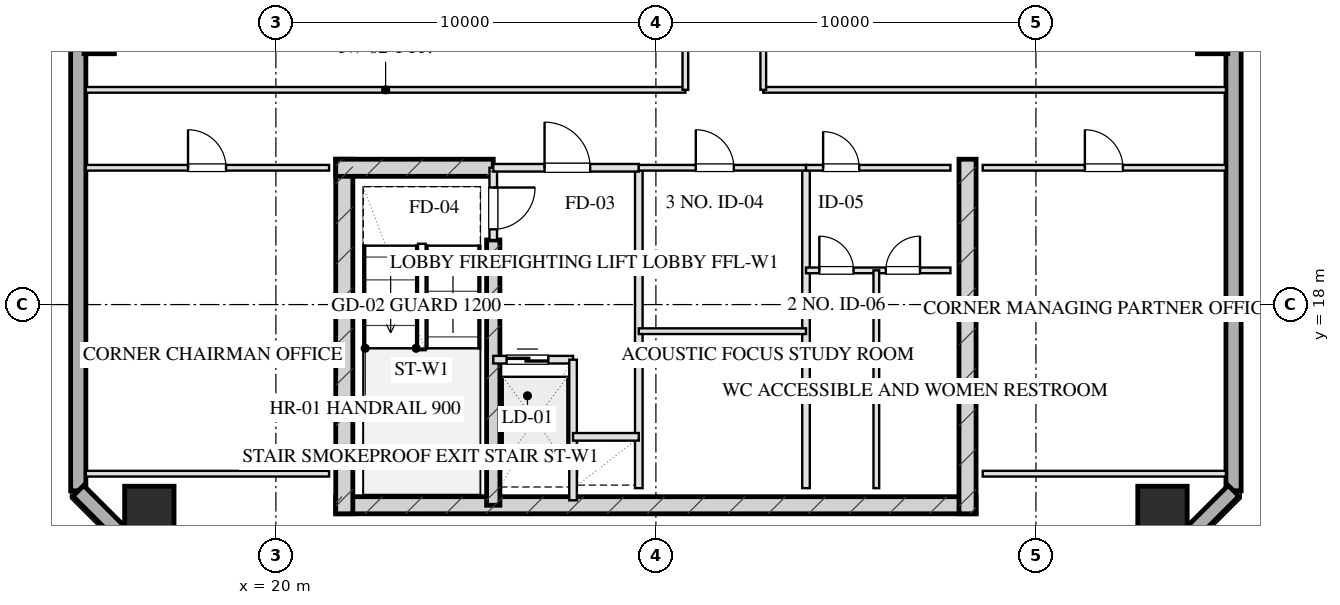
"""IFC4 building model, lengths in metres.
Left out: names, types, materials, properties, quantities, classifications, styles, units other than length and angle.
Written with IfcOpenShell. Run it as: python <this file> out.ifc"""

import sys

from ifc_helpers import new_model, si_unit, direction, frame, frame_2d, origin, origin_2d, place, context, subcontext, project, spatial, rectangle, hollow_rectangle, extrude, element, fill, save


model = new_model("IFC4")
c1 = context("Model", 3, precision=1e-05, world=origin(), true_north=direction((0.0, 1.0)))
c2 = subcontext(c1, "Body", "Model", "MODEL_VIEW")
j1 = project(units=[si_unit("LENGTHUNIT", "METRE"), si_unit("PLANEANGLEUNIT", "RADIAN")], contexts=[c1])
p1 = place(None, origin())
s1 = spatial("IfcSite", under=j1, at=p1, CompositionType="ELEMENT")
p2 = place(p1, origin())
s2 = spatial("IfcBuilding", under=s1, at=p2, CompositionType="ELEMENT")
p3 = place(p2, frame((0.0, 0.0, 250.4)))
s3 = spatial("IfcBuildingStorey", under=s2, at=p3, CompositionType="ELEMENT", Elevation=250.4)
p4 = place(p3, frame((21.575, 12.72, 0.0), z_axis=(0.0, 0.0, 1.0), x_axis=(1.0, 0.0, 0.0)))
e1 = element("IfcWall", 1, at=p4, inside=s3, PredefinedType="SHEAR", context=c2, shape_type="SweptSolid", body=[
    extrude(rectangle(XDim=16.85, YDim=0.45, at=frame_2d((8.425, 0.0))), origin(), (0.0, 0.0, 1.0), 3.2),
])
for number, where, z_axis, x_axis in (
    (2, (21.8, 21.825, 0.0), (0.0, 0.0, 1.0), (0.0, -1.0, 0.0)),
    (3, (38.2, 21.825, 0.0), (0.0, 0.0, 1.0), (0.0, -1.0, 0.0)),
):
    element("IfcWall", number, at=place(p3, frame(where, z_axis=z_axis, x_axis=x_axis)), inside=s3, PredefinedType="SHEAR", context=c2, shape_type="SweptSolid", body=[
        extrude(rectangle(XDim=9.33, YDim=0.45, at=frame_2d((4.665, 0.0))), origin(), (0.0, 0.0, 1.0), 3.2),
    ])
p5 = place(p3, frame((25.72, 19.7, 0.0), z_axis=(0.0, 0.0, 1.0), x_axis=(0.0, -1.0, 0.0)))
e4 = element("IfcWall", 4, at=p5, inside=s3, PredefinedType="SHEAR", context=c2, shape_type="SweptSolid", body=[
    extrude(rectangle(XDim=6.98, YDim=0.35, at=frame_2d((3.49, 0.0))), origin(), (0.0, 0.0, 1.0), 3.2),
])
p6 = place(p3, frame((21.575, 21.6, 0.0), z_axis=(0.0, 0.0, 1.0), x_axis=(1.0, 0.0, 0.0)))
e5 = element("IfcWall", 5, at=p6, inside=s3, PredefinedType="SHEAR", context=c2, shape_type="SweptSolid", body=[
    extrude(rectangle(XDim=4.145, YDim=0.45, at=frame_2d((2.073, 0.0))), origin(), (0.0, 0.0, 1.0), 3.2),
])
for number, where, z_axis, x_axis in (
    (6, (16.67, 12.57, 0.0), (0.0, 0.0, 1.0), (1.0, 0.0, 0.0)),
    (7, (43.33, 12.57, 0.0), (0.0, 0.0, 1.0), (1.0, 0.0, 0.0)),
):
    element("IfcColumn", number, at=place(p3, frame(where, z_axis=z_axis, x_axis=x_axis)), inside=s3, PredefinedType="COLUMN", context=c2, shape_type="SweptSolid", body=[
        extrude(hollow_rectangle(XDim=1.3, YDim=1.3, WallThickness=0.045, at=origin_2d()), origin(), (0.0, 0.0, 1.0), 3.201),
    ])
for number, where, z_axis, x_axis in (
    (8, (15.35, 25.0, 0.0), (0.0, 0.0, 1.0), (1.0, 0.0, 0.0)),
    (9, (44.65, 25.0, 0.0), (0.0, 0.0, 1.0), (1.0, 0.0, 0.0)),
):
    element("IfcColumn", number, at=place(p3, frame(where, z_axis=z_axis, x_axis=x_axis)), inside=s3, PredefinedType="COLUMN", context=c2, shape_type="SweptSolid", body=[
        extrude(hollow_rectangle(XDim=0.8, YDim=0.8, WallThickness=0.028, at=origin_2d()), origin(), (0.0, 0.0, 1.0), 3.201),
    ])
p7 = place(p3, frame((14.8, 13.1, 0.0), z_axis=(0.0, 0.0, 1.0), x_axis=(0.0, 1.0, 0.0)))
e10 = element("IfcWall", 10, at=p7, inside=s3, PredefinedType="SOLIDWALL", context=c2, shape_type="SweptSolid", body=[
    extrude(rectangle(XDim=41.8, YDim=0.4, at=frame_2d((20.9, 0.0))), origin(), (0.0, 0.0, 1.0), 2.36),
])
p8 = place(p7, frame((22.525, 0.0, 0.75)))
e11 = element("IfcOpeningElement", 11, at=p8, cuts=e10, PredefinedType="OPENING", context=c2, shape_type="SweptSolid", body=[
    extrude(rectangle(XDim=1.95, YDim=1.21, at=frame_2d((0.975, 0.605))), frame((0.0, 0.21, 0.0), z_axis=(0.0, -1.0, 0.0), x_axis=(1.0, 0.0, 0.0)), (0.0, 0.0, 1.0), 0.42),
])
p9 = place(p7, frame((26.325, 0.0, 0.75)))
e12 = element("IfcOpeningElement", 12, at=p9, cuts=e10, PredefinedType="OPENING", context=c2, shape_type="SweptSolid", body=[
    extrude(rectangle(XDim=1.95, YDim=1.21, at=frame_2d((0.975, 0.605))), frame((0.0, 0.21, 0.0), z_axis=(0.0, -1.0, 0.0), x_axis=(1.0, 0.0, 0.0)), (0.0, 0.0, 1.0), 0.42),
])
p10 = place(p7, frame((17.25, 0.0, 0.0)))
e13 = element("IfcOpeningElement", 13, at=p10, cuts=e10, PredefinedType="OPENING", context=c2, shape_type="SweptSolid", body=[
    extrude(rectangle(XDim=1.1, YDim=2.15, at=frame_2d((0.55, 1.075))), frame((0.0, 0.21, 0.0), z_axis=(0.0, -1.0, 0.0), x_axis=(1.0, 0.0, 0.0)), (0.0, 0.0, 1.0), 0.42),
])
p11 = place(p3, frame((45.2, 54.9, 0.0), z_axis=(0.0, 0.0, 1.0), x_axis=(0.0, -1.0, 0.0)))
e14 = element("IfcWall", 14, at=p11, inside=s3, PredefinedType="SOLIDWALL", context=c2, shape_type="SweptSolid", body=[
    extrude(rectangle(XDim=41.8, YDim=0.4, at=frame_2d((20.9, 0.0))), origin(), (0.0, 0.0, 1.0), 2.36),
])
p12 = place(p11, frame((17.325, 0.0, 0.75)))
e15 = element("IfcOpeningElement", 15, at=p12, cuts=e14, PredefinedType="OPENING", context=c2, shape_type="SweptSolid", body=[
    extrude(rectangle(XDim=1.95, YDim=1.21, at=frame_2d((0.975, 0.605))), frame((0.0, 0.21, 0.0), z_axis=(0.0, -1.0, 0.0), x_axis=(1.0, 0.0, 0.0)), (0.0, 0.0, 1.0), 0.42),
])
p13 = place(p11, frame((13.525, 0.0, 0.75)))
e16 = element("IfcOpeningElement", 16, at=p13, cuts=e14, PredefinedType="OPENING", context=c2, shape_type="SweptSolid", body=[
    extrude(rectangle(XDim=1.95, YDim=1.21, at=frame_2d((0.975, 0.605))), frame((0.0, 0.21, 0.0), z_axis=(0.0, -1.0, 0.0), x_axis=(1.0, 0.0, 0.0)), (0.0, 0.0, 1.0), 0.42),
])
p14 = place(p11, frame((26.15, 0.0, 0.0)))
e17 = element("IfcOpeningElement", 17, at=p14, cuts=e14, PredefinedType="OPENING", context=c2, shape_type="SweptSolid", body=[
    extrude(rectangle(XDim=1.1, YDim=2.15, at=frame_2d((0.55, 1.075))), frame((0.0, 0.21, 0.0), z_axis=(0.0, -1.0, 0.0), x_axis=(1.0, 0.0, 0.0)), (0.0, 0.0, 1.0), 0.42),
])
for number, where, z_axis, x_axis in (
    (18, (45.2, 13.1, 0.0), (0.0, 0.0, 1.0), (-0.707, -0.707, 0.0)),
    (19, (17.2, 10.7, 0.0), (0.0, 0.0, 1.0), (-0.707, 0.707, 0.0)),
):
    element("IfcWall", number, at=place(p3, frame(where, z_axis=z_axis, x_axis=x_axis)), inside=s3, PredefinedType="SOLIDWALL", context=c2, shape_type="SweptSolid", body=[
        extrude(rectangle(XDim=3.394, YDim=0.4, at=frame_2d((1.697, 0.0))), origin(), (0.0, 0.0, 1.0), 2.36),
    ])
p15 = place(p3, frame((25.72, 21.6, 0.0), z_axis=(0.0, 0.0, 1.0), x_axis=(0.0, -1.0, 0.0)))
e20 = element("IfcWall", 20, at=p15, inside=s3, PredefinedType="PARTITIONING", context=c2, shape_type="SweptSolid", body=[
    extrude(rectangle(XDim=1.9, YDim=0.2, at=frame_2d((0.95, 0.0))), origin(), (0.0, 0.0, 1.0), 2.925),
])
p16 = place(p15, frame((0.52, 0.0, 0.0)))
e21 = element("IfcOpeningElement", 21, at=p16, cuts=e20, PredefinedType="OPENING", context=c2, shape_type="SweptSolid", body=[
    extrude(rectangle(XDim=1.1, YDim=2.05, at=frame_2d((0.55, 1.025))), frame((0.0, 0.11, 0.0), z_axis=(0.0, -1.0, 0.0), x_axis=(1.0, 0.0, 0.0)), (0.0, 0.0, 1.0), 0.22),
])
p17 = place(p3, frame((29.55, 21.6, 0.0), z_axis=(0.0, 0.0, 1.0), x_axis=(0.0, -1.0, 0.0)))
e22 = element("IfcWall", 22, at=p17, inside=s3, PredefinedType="PARTITIONING", context=c2, shape_type="SweptSolid", body=[
    extrude(rectangle(XDim=8.43, YDim=0.2, at=frame_2d((4.215, 0.0))), origin(), (0.0, 0.0, 1.0), 2.925),
])
p18 = place(p3, frame((25.72, 21.6, 0.0), z_axis=(0.0, 0.0, 1.0), x_axis=(1.0, 0.0, 0.0)))
e23 = element("IfcWall", 23, at=p18, inside=s3, PredefinedType="PARTITIONING", context=c2, shape_type="SweptSolid", body=[
    extrude(rectangle(XDim=3.83, YDim=0.2, at=frame_2d((1.915, 0.0))), origin(), (0.0, 0.0, 1.0), 2.925),
])
p19 = place(p18, frame((1.35, 0.0, 0.0)))
e24 = element("IfcOpeningElement", 24, at=p19, cuts=e23, PredefinedType="OPENING", context=c2, shape_type="SweptSolid", body=[
    extrude(rectangle(XDim=1.2, YDim=2.05, at=frame_2d((0.6, 1.025))), frame((0.0, 0.11, 0.0), z_axis=(0.0, -1.0, 0.0), x_axis=(1.0, 0.0, 0.0)), (0.0, 0.0, 1.0), 0.22),
])
p20 = place(p3, frame((25.72, 16.55, 0.0), z_axis=(0.0, 0.0, 1.0), x_axis=(1.0, 0.0, 0.0)))
e25 = element("IfcWall", 25, at=p20, inside=s3, PredefinedType="PARTITIONING", context=c2, shape_type="SweptSolid", body=[
    extrude(rectangle(XDim=2.1, YDim=0.2, at=frame_2d((1.05, 0.0))), origin(), (0.0, 0.0, 1.0), 2.925),
])
p21 = place(p20, frame((0.35, 0.0, 0.0)))
e26 = element("IfcOpeningElement", 26, at=p21, cuts=e25, PredefinedType="OPENING", context=c2, shape_type="SweptSolid", body=[
    extrude(rectangle(XDim=1.1, YDim=2.05, at=frame_2d((0.55, 1.025))), frame((0.0, 0.11, 0.0), z_axis=(0.0, -1.0, 0.0), x_axis=(1.0, 0.0, 0.0)), (0.0, 0.0, 1.0), 0.22),
])
p22 = place(p3, frame((27.82, 16.55, 0.0), z_axis=(0.0, 0.0, 1.0), x_axis=(0.0, -1.0, 0.0)))
e27 = element("IfcWall", 27, at=p22, inside=s3, PredefinedType="PARTITIONING", context=c2, shape_type="SweptSolid", body=[
    extrude(rectangle(XDim=3.7, YDim=0.2, at=frame_2d((1.85, 0.0))), origin(), (0.0, 0.0, 1.0), 2.925),
])
p23 = place(p3, frame((27.82, 14.52, 0.0), z_axis=(0.0, 0.0, 1.0), x_axis=(1.0, 0.0, 0.0)))
e28 = element("IfcWall", 28, at=p23, inside=s3, PredefinedType="PARTITIONING", context=c2, shape_type="SweptSolid", body=[
    extrude(rectangle(XDim=1.73, YDim=0.2, at=frame_2d((0.865, 0.0))), origin(), (0.0, 0.0, 1.0), 2.925),
])
p24 = place(p3, frame((33.95, 21.6, 0.0), z_axis=(0.0, 0.0, 1.0), x_axis=(0.0, -1.0, 0.0)))
e29 = element("IfcWall", 29, at=p24, inside=s3, PredefinedType="PARTITIONING", context=c2, shape_type="SweptSolid", body=[
    extrude(rectangle(XDim=8.43, YDim=0.2, at=frame_2d((4.215, 0.0))), origin(), (0.0, 0.0, 1.0), 2.925),
])
p25 = place(p3, frame((29.55, 21.6, 0.0), z_axis=(0.0, 0.0, 1.0), x_axis=(1.0, 0.0, 0.0)))
e30 = element("IfcWall", 30, at=p25, inside=s3, PredefinedType="PARTITIONING", context=c2, shape_type="SweptSolid", body=[
    extrude(rectangle(XDim=4.4, YDim=0.15, at=frame_2d((2.2, 0.0))), origin(), (0.0, 0.0, 1.0), 2.925),
])
p26 = place(p25, frame((1.5, 0.0, 0.0)))
e31 = element("IfcOpeningElement", 31, at=p26, cuts=e30, PredefinedType="OPENING", context=c2, shape_type="SweptSolid", body=[
    extrude(rectangle(XDim=1.0, YDim=2.05, at=frame_2d((0.5, 1.025))), frame((0.0, 0.085, 0.0), z_axis=(0.0, -1.0, 0.0), x_axis=(1.0, 0.0, 0.0)), (0.0, 0.0, 1.0), 0.17),
])
p27 = place(p3, frame((29.55, 17.3, 0.0), z_axis=(0.0, 0.0, 1.0), x_axis=(1.0, 0.0, 0.0)))
e32 = element("IfcWall", 32, at=p27, inside=s3, PredefinedType="PARTITIONING", context=c2, shape_type="SweptSolid", body=[
    extrude(rectangle(XDim=4.4, YDim=0.15, at=frame_2d((2.2, 0.0))), origin(), (0.0, 0.0, 1.0), 2.925),
])
p28 = place(p3, frame((33.95, 21.6, 0.0), z_axis=(0.0, 0.0, 1.0), x_axis=(1.0, 0.0, 0.0)))
e33 = element("IfcWall", 33, at=p28, inside=s3, PredefinedType="PARTITIONING", context=c2, shape_type="SweptSolid", body=[
    extrude(rectangle(XDim=3.8, YDim=0.15, at=frame_2d((1.9, 0.0))), origin(), (0.0, 0.0, 1.0), 2.925),
])
p29 = place(p28, frame((0.45, 0.0, 0.0)))
e34 = element("IfcOpeningElement", 34, at=p29, cuts=e33, PredefinedType="OPENING", context=c2, shape_type="SweptSolid", body=[
    extrude(rectangle(XDim=0.95, YDim=2.05, at=frame_2d((0.475, 1.025))), frame((0.0, 0.085, 0.0), z_axis=(0.0, -1.0, 0.0), x_axis=(1.0, 0.0, 0.0)), (0.0, 0.0, 1.0), 0.17),
])
p30 = place(p3, frame((33.95, 18.9, 0.0), z_axis=(0.0, 0.0, 1.0), x_axis=(1.0, 0.0, 0.0)))
e35 = element("IfcWall", 35, at=p30, inside=s3, PredefinedType="PARTITIONING", context=c2, shape_type="SweptSolid", body=[
    extrude(rectangle(XDim=3.8, YDim=0.15, at=frame_2d((1.9, 0.0))), origin(), (0.0, 0.0, 1.0), 2.925),
])
p31 = place(p30, frame((0.35, 0.0, 0.0)))
e36 = element("IfcOpeningElement", 36, at=p31, cuts=e35, PredefinedType="OPENING", context=c2, shape_type="SweptSolid", body=[
    extrude(rectangle(XDim=0.9, YDim=2.05, at=frame_2d((0.45, 1.025))), frame((0.0, 0.085, 0.0), z_axis=(0.0, -1.0, 0.0), x_axis=(1.0, 0.0, 0.0)), (0.0, 0.0, 1.0), 0.17),
])
p32 = place(p30, frame((2.1, 0.0, 0.0)))
e37 = element("IfcOpeningElement", 37, at=p32, cuts=e35, PredefinedType="OPENING", context=c2, shape_type="SweptSolid", body=[
    extrude(rectangle(XDim=0.9, YDim=2.05, at=frame_2d((0.45, 1.025))), frame((0.0, 0.085, 0.0), z_axis=(0.0, -1.0, 0.0), x_axis=(1.0, 0.0, 0.0)), (0.0, 0.0, 1.0), 0.17),
])
p33 = place(p3, frame((35.8, 18.9, 0.0), z_axis=(0.0, 0.0, 1.0), x_axis=(0.0, -1.0, 0.0)))
e38 = element("IfcWall", 38, at=p33, inside=s3, PredefinedType="PARTITIONING", context=c2, shape_type="SweptSolid", body=[
    extrude(rectangle(XDim=5.73, YDim=0.15, at=frame_2d((2.865, 0.0))), origin(), (0.0, 0.0, 1.0), 2.925),
])
p34 = place(p3, frame((15.0, 13.55, 0.0), z_axis=(0.0, 0.0, 1.0), x_axis=(1.0, 0.0, 0.0)))
e39 = element("IfcWall", 39, at=p34, inside=s3, PredefinedType="PARTITIONING", context=c2, shape_type="SweptSolid", body=[
    extrude(rectangle(XDim=6.4, YDim=0.15, at=frame_2d((3.2, 0.0))), origin(), (0.0, 0.0, 1.0), 2.925),
])
p35 = place(p3, frame((15.0, 21.6, 0.0), z_axis=(0.0, 0.0, 1.0), x_axis=(1.0, 0.0, 0.0)))
e40 = element("IfcWall", 40, at=p35, inside=s3, PredefinedType="PARTITIONING", context=c2, shape_type="SweptSolid", body=[
    extrude(rectangle(XDim=6.4, YDim=0.15, at=frame_2d((3.2, 0.0))), origin(), (0.0, 0.0, 1.0), 2.925),
])
p36 = place(p35, frame((2.688, 0.0, 0.0)))
e41 = element("IfcOpeningElement", 41, at=p36, cuts=e40, PredefinedType="OPENING", context=c2, shape_type="SweptSolid", body=[
    extrude(rectangle(XDim=1.0, YDim=2.05, at=frame_2d((0.5, 1.025))), frame((0.0, 0.085, 0.0), z_axis=(0.0, -1.0, 0.0), x_axis=(1.0, 0.0, 0.0)), (0.0, 0.0, 1.0), 0.17),
])
p37 = place(p3, frame((38.6, 13.55, 0.0), z_axis=(0.0, 0.0, 1.0), x_axis=(1.0, 0.0, 0.0)))
e42 = element("IfcWall", 42, at=p37, inside=s3, PredefinedType="PARTITIONING", context=c2, shape_type="SweptSolid", body=[
    extrude(rectangle(XDim=6.4, YDim=0.15, at=frame_2d((3.2, 0.0))), origin(), (0.0, 0.0, 1.0), 2.925),
])
p38 = place(p3, frame((38.6, 21.6, 0.0), z_axis=(0.0, 0.0, 1.0), x_axis=(1.0, 0.0, 0.0)))
e43 = element("IfcWall", 43, at=p38, inside=s3, PredefinedType="PARTITIONING", context=c2, shape_type="SweptSolid", body=[
    extrude(rectangle(XDim=6.4, YDim=0.15, at=frame_2d((3.2, 0.0))), origin(), (0.0, 0.0, 1.0), 2.925),
])
p39 = place(p38, frame((2.688, 0.0, 0.0)))
e44 = element("IfcOpeningElement", 44, at=p39, cuts=e43, PredefinedType="OPENING", context=c2, shape_type="SweptSolid", body=[
    extrude(rectangle(XDim=1.0, YDim=2.05, at=frame_2d((0.5, 1.025))), frame((0.0, 0.085, 0.0), z_axis=(0.0, -1.0, 0.0), x_axis=(1.0, 0.0, 0.0)), (0.0, 0.0, 1.0), 0.17),
])
p40 = place(p3, frame((15.0, 23.65, 0.0), z_axis=(0.0, 0.0, 1.0), x_axis=(1.0, 0.0, 0.0)))
e45 = element("IfcWall", 45, at=p40, inside=s3, PredefinedType="PARTITIONING", context=c2, shape_type="SweptSolid", body=[
    extrude(rectangle(XDim=15.775, YDim=0.15, at=frame_2d((7.887, 0.0))), origin(), (0.0, 0.0, 1.0), 2.925),
])
p41 = place(p3, frame((32.825, 23.65, 0.0), z_axis=(0.0, 0.0, 1.0), x_axis=(1.0, 0.0, 0.0)))
e46 = element("IfcWall", 46, at=p41, inside=s3, PredefinedType="PARTITIONING", context=c2, shape_type="SweptSolid", body=[
    extrude(rectangle(XDim=12.175, YDim=0.15, at=frame_2d((6.087, 0.0))), origin(), (0.0, 0.0, 1.0), 2.925),
])
p42 = place(p3, frame((30.775, 23.65, 0.0), z_axis=(0.0, 0.0, 1.0), x_axis=(0.0, 1.0, 0.0)))
e47 = element("IfcWall", 47, at=p42, inside=s3, PredefinedType="PARTITIONING", context=c2, shape_type="SweptSolid", body=[
    extrude(rectangle(XDim=20.7, YDim=0.15, at=frame_2d((10.35, 0.0))), origin(), (0.0, 0.0, 1.0), 2.925),
])
p43 = place(p42, frame((2.175, 0.0, 0.0)))
e48 = element("IfcOpeningElement", 48, at=p43, cuts=e47, PredefinedType="OPENING", context=c2, shape_type="SweptSolid", body=[
    extrude(rectangle(XDim=1.0, YDim=2.05, at=frame_2d((0.5, 1.025))), frame((0.0, 0.085, 0.0), z_axis=(0.0, -1.0, 0.0), x_axis=(1.0, 0.0, 0.0)), (0.0, 0.0, 1.0), 0.17),
])
p44 = place(p42, frame((7.69, 0.0, 0.0)))
e49 = element("IfcOpeningElement", 49, at=p44, cuts=e47, PredefinedType="OPENING", context=c2, shape_type="SweptSolid", body=[
    extrude(rectangle(XDim=1.0, YDim=2.05, at=frame_2d((0.5, 1.025))), frame((0.0, 0.085, 0.0), z_axis=(0.0, -1.0, 0.0), x_axis=(1.0, 0.0, 0.0)), (0.0, 0.0, 1.0), 0.17),
])
p45 = place(p42, frame((12.69, 0.0, 0.0)))
e50 = element("IfcOpeningElement", 50, at=p45, cuts=e47, PredefinedType="OPENING", context=c2, shape_type="SweptSolid", body=[
    extrude(rectangle(XDim=1.0, YDim=2.05, at=frame_2d((0.5, 1.025))), frame((0.0, 0.085, 0.0), z_axis=(0.0, -1.0, 0.0), x_axis=(1.0, 0.0, 0.0)), (0.0, 0.0, 1.0), 0.17),
])
p46 = place(p42, frame((17.525, 0.0, 0.0)))
e51 = element("IfcOpeningElement", 51, at=p46, cuts=e47, PredefinedType="OPENING", context=c2, shape_type="SweptSolid", body=[
    extrude(rectangle(XDim=1.0, YDim=2.05, at=frame_2d((0.5, 1.025))), frame((0.0, 0.085, 0.0), z_axis=(0.0, -1.0, 0.0), x_axis=(1.0, 0.0, 0.0)), (0.0, 0.0, 1.0), 0.17),
])
p47 = place(p3, frame((32.825, 23.65, 0.0), z_axis=(0.0, 0.0, 1.0), x_axis=(0.0, 1.0, 0.0)))
e52 = element("IfcWall", 52, at=p47, inside=s3, PredefinedType="PARTITIONING", context=c2, shape_type="SweptSolid", body=[
    extrude(rectangle(XDim=20.7, YDim=0.15, at=frame_2d((10.35, 0.0))), origin(), (0.0, 0.0, 1.0), 2.925),
])
p48 = place(p47, frame((2.675, 0.0, 0.0)))
e53 = element("IfcOpeningElement", 53, at=p48, cuts=e52, PredefinedType="OPENING", context=c2, shape_type="SweptSolid", body=[
    extrude(rectangle(XDim=1.0, YDim=2.05, at=frame_2d((0.5, 1.025))), frame((0.0, 0.085, 0.0), z_axis=(0.0, -1.0, 0.0), x_axis=(1.0, 0.0, 0.0)), (0.0, 0.0, 1.0), 0.17),
])
p49 = place(p47, frame((9.85, 0.0, 0.0)))
e54 = element("IfcOpeningElement", 54, at=p49, cuts=e52, PredefinedType="OPENING", context=c2, shape_type="SweptSolid", body=[
    extrude(rectangle(XDim=0.85, YDim=2.05, at=frame_2d((0.425, 1.025))), frame((0.0, 0.085, 0.0), z_axis=(0.0, -1.0, 0.0), x_axis=(1.0, 0.0, 0.0)), (0.0, 0.0, 1.0), 0.17),
])
p50 = place(p47, frame((17.025, 0.0, 0.0)))
e55 = element("IfcOpeningElement", 55, at=p50, cuts=e52, PredefinedType="OPENING", context=c2, shape_type="SweptSolid", body=[
    extrude(rectangle(XDim=1.05, YDim=2.05, at=frame_2d((0.525, 1.025))), frame((0.0, 0.085, 0.0), z_axis=(0.0, -1.0, 0.0), x_axis=(1.0, 0.0, 0.0)), (0.0, 0.0, 1.0), 0.17),
])
p51 = place(p16, origin())
e56 = element("IfcDoor", 56, at=p51, inside=s3, OperationType="SINGLE_SWING_LEFT", PredefinedType="DOOR", context=c2, shape_type="SweptSolid", body=[
    extrude(rectangle(XDim=1.1, YDim=2.05, at=frame_2d((0.55, 1.025))), frame((0.0, 0.025, 0.0), z_axis=(0.0, -1.0, 0.0), x_axis=(1.0, 0.0, 0.0)), (0.0, 0.0, 1.0), 0.05),
])
fill(e21, e56)
p52 = place(p19, origin())
e57 = element("IfcDoor", 57, at=p52, inside=s3, OperationType="SINGLE_SWING_LEFT", PredefinedType="DOOR", context=c2, shape_type="SweptSolid", body=[
    extrude(rectangle(XDim=1.2, YDim=2.05, at=frame_2d((0.6, 1.025))), frame((0.0, 0.025, 0.0), z_axis=(0.0, -1.0, 0.0), x_axis=(1.0, 0.0, 0.0)), (0.0, 0.0, 1.0), 0.05),
])
fill(e24, e57)
p53 = place(p21, origin())
e58 = element("IfcDoor", 58, at=p53, inside=s3, OperationType="DOUBLE_DOOR_SLIDING", PredefinedType="DOOR", context=c2, shape_type="SweptSolid", body=[
    extrude(rectangle(XDim=1.1, YDim=2.05, at=frame_2d((0.55, 1.025))), frame((0.0, 0.025, 0.0), z_axis=(0.0, -1.0, 0.0), x_axis=(1.0, 0.0, 0.0)), (0.0, 0.0, 1.0), 0.05),
])
fill(e26, e58)
p54 = place(p26, origin())
e59 = element("IfcDoor", 59, at=p54, inside=s3, OperationType="SINGLE_SWING_LEFT", PredefinedType="DOOR", context=c2, shape_type="SweptSolid", body=[
    extrude(rectangle(XDim=1.0, YDim=2.05, at=frame_2d((0.5, 1.025))), frame((0.0, 0.025, 0.0), z_axis=(0.0, -1.0, 0.0), x_axis=(1.0, 0.0, 0.0)), (0.0, 0.0, 1.0), 0.05),
])
fill(e31, e59)
p55 = place(p29, origin())
e60 = element("IfcDoor", 60, at=p55, inside=s3, OperationType="SINGLE_SWING_LEFT", PredefinedType="DOOR", context=c2, shape_type="SweptSolid", body=[
    extrude(rectangle(XDim=0.95, YDim=2.05, at=frame_2d((0.475, 1.025))), frame((0.0, 0.025, 0.0), z_axis=(0.0, -1.0, 0.0), x_axis=(1.0, 0.0, 0.0)), (0.0, 0.0, 1.0), 0.05),
])
fill(e34, e60)
p56 = place(p31, origin())
e61 = element("IfcDoor", 61, at=p56, inside=s3, OperationType="SINGLE_SWING_LEFT", PredefinedType="DOOR", context=c2, shape_type="SweptSolid", body=[
    extrude(rectangle(XDim=0.9, YDim=2.05, at=frame_2d((0.45, 1.025))), frame((0.0, 0.025, 0.0), z_axis=(0.0, -1.0, 0.0), x_axis=(1.0, 0.0, 0.0)), (0.0, 0.0, 1.0), 0.05),
])
fill(e36, e61)
p57 = place(p32, origin())
e62 = element("IfcDoor", 62, at=p57, inside=s3, OperationType="SINGLE_SWING_RIGHT", PredefinedType="DOOR", context=c2, shape_type="SweptSolid", body=[
    extrude(rectangle(XDim=0.9, YDim=2.05, at=frame_2d((0.45, 1.025))), frame((0.0, 0.025, 0.0), z_axis=(0.0, -1.0, 0.0), x_axis=(1.0, 0.0, 0.0)), (0.0, 0.0, 1.0), 0.05),
])
fill(e37, e62)
p58 = place(p36, origin())
e63 = element("IfcDoor", 63, at=p58, inside=s3, OperationType="SINGLE_SWING_LEFT", PredefinedType="DOOR", context=c2, shape_type="SweptSolid", body=[
    extrude(rectangle(XDim=1.0, YDim=2.05, at=frame_2d((0.5, 1.025))), frame((0.0, 0.025, 0.0), z_axis=(0.0, -1.0, 0.0), x_axis=(1.0, 0.0, 0.0)), (0.0, 0.0, 1.0), 0.05),
])
fill(e41, e63)
p59 = place(p39, origin())
e64 = element("IfcDoor", 64, at=p59, inside=s3, OperationType="SINGLE_SWING_LEFT", PredefinedType="DOOR", context=c2, shape_type="SweptSolid", body=[
    extrude(rectangle(XDim=1.0, YDim=2.05, at=frame_2d((0.5, 1.025))), frame((0.0, 0.025, 0.0), z_axis=(0.0, -1.0, 0.0), x_axis=(1.0, 0.0, 0.0)), (0.0, 0.0, 1.0), 0.05),
])
fill(e44, e64)
save(model, sys.argv[1])
